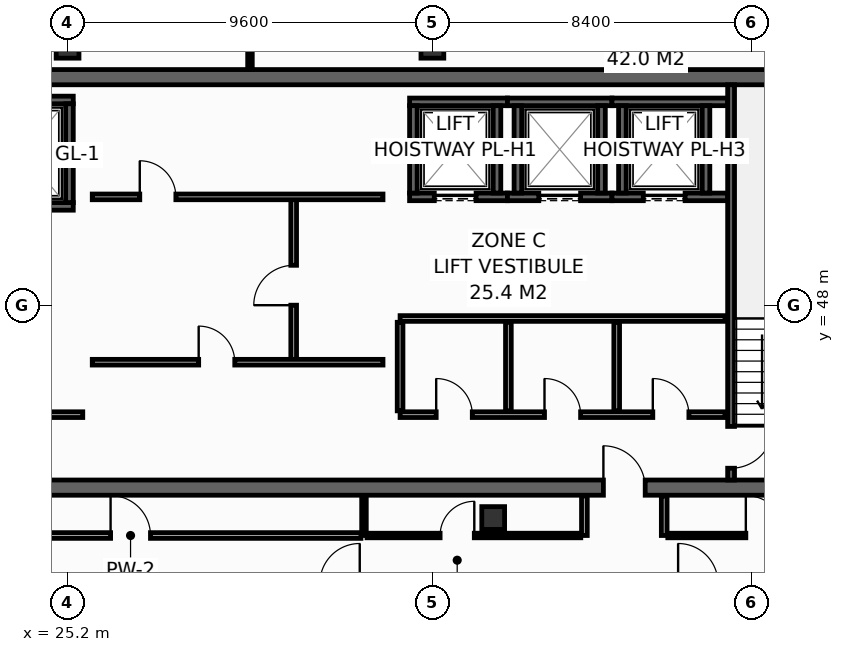
"""IFC4 building model, lengths in metres.
Left out: names, types, materials, properties, quantities, classifications, styles, units other than length and angle.
Written with IfcOpenShell. Run it as: python <this file> out.ifc"""

import sys

from ifc_helpers import new_model, si_unit, direction, frame, frame_2d, origin, origin_2d, place, context, subcontext, project, spatial, rectangle, hollow_rectangle, extrude, element, fill, save


model = new_model("IFC4")
c1 = context("Model", 3, precision=1e-05, world=origin(), true_north=direction((0.0, 1.0)))
c2 = subcontext(c1, "Body", "Model", "MODEL_VIEW")
j1 = project(units=[si_unit("LENGTHUNIT", "METRE"), si_unit("PLANEANGLEUNIT", "RADIAN")], contexts=[c1])
p1 = place(None, origin())
s1 = spatial("IfcSite", under=j1, at=p1, CompositionType="ELEMENT")
p2 = place(p1, origin())
s2 = spatial("IfcBuilding", under=s1, at=p2, CompositionType="ELEMENT")
p3 = place(p2, frame((0.0, 0.0, 299.0)))
s3 = spatial("IfcBuildingStorey", under=s2, at=p3, CompositionType="ELEMENT", Elevation=299.0)
p4 = place(p3, frame((13.7, 43.2, 0.0), z_axis=(0.0, 0.0, 1.0), x_axis=(1.0, 0.0, 0.0)))
e1 = element("IfcWall", 1, at=p4, inside=s3, PredefinedType="SHEAR", context=c2, shape_type="SweptSolid", body=[
    extrude(rectangle(XDim=32.5, YDim=0.4, at=frame_2d((16.25, 0.0))), origin(), (0.0, 0.0, 1.0), 3.55),
])
p5 = place(p4, frame((5.4, 0.0, 0.0)))
e2 = element("IfcOpeningElement", 2, at=p5, cuts=e1, PredefinedType="OPENING", context=c2, shape_type="SweptSolid", body=[
    extrude(rectangle(XDim=1.1, YDim=2.15, at=frame_2d((0.55, 1.075))), frame((0.0, 0.21, 0.0), z_axis=(0.0, -1.0, 0.0), x_axis=(1.0, 0.0, 0.0)), (0.0, 0.0, 1.0), 0.42),
])
p6 = place(p4, frame((25.6, 0.0, 0.0)))
e3 = element("IfcOpeningElement", 3, at=p6, cuts=e1, PredefinedType="OPENING", context=c2, shape_type="SweptSolid", body=[
    extrude(rectangle(XDim=1.1, YDim=2.15, at=frame_2d((0.55, 1.075))), frame((0.0, 0.21, 0.0), z_axis=(0.0, -1.0, 0.0), x_axis=(1.0, 0.0, 0.0)), (0.0, 0.0, 1.0), 0.42),
])
p7 = place(p3, frame((13.7, 54.0, 0.0), z_axis=(0.0, 0.0, 1.0), x_axis=(1.0, 0.0, 0.0)))
e4 = element("IfcWall", 4, at=p7, inside=s3, PredefinedType="SHEAR", context=c2, shape_type="SweptSolid", body=[
    extrude(rectangle(XDim=32.5, YDim=0.4, at=frame_2d((16.25, 0.0))), origin(), (0.0, 0.0, 1.0), 3.55),
])
for number, where, z_axis, x_axis in (
    (5, (25.2, 54.8, 0.0), (0.0, 0.0, 1.0), (1.0, 0.0, 0.0)),
    (6, (34.8, 54.8, 0.0), (0.0, 0.0, 1.0), (1.0, 0.0, 0.0)),
    (7, (36.4, 42.4, 0.0), (0.0, 0.0, 1.0), (1.0, 0.0, 0.0)),
):
    element("IfcColumn", number, at=place(p3, frame(where, z_axis=z_axis, x_axis=x_axis)), inside=s3, PredefinedType="COLUMN", context=c2, shape_type="SweptSolid", body=[
        extrude(hollow_rectangle(XDim=0.6, YDim=0.6, WallThickness=0.028, at=origin_2d()), origin(), (0.0, 0.0, 1.0), 3.8),
    ])
p8 = place(p3, frame((22.5, 50.6, 0.0), z_axis=(0.0, 0.0, 1.0), x_axis=(1.0, 0.0, 0.0)))
e8 = element("IfcWall", 8, at=p8, inside=s3, PredefinedType="SHEAR", context=c2, shape_type="SweptSolid", body=[
    extrude(rectangle(XDim=2.85, YDim=0.2, at=frame_2d((1.425, 0.0))), origin(), (0.0, 0.0, 1.0), 3.55),
])
p9 = place(p8, frame((0.925, 0.0, 0.0)))
e9 = element("IfcOpeningElement", 9, at=p9, cuts=e8, PredefinedType="OPENING", context=c2, shape_type="SweptSolid", body=[
    extrude(rectangle(XDim=1.25, YDim=2.3, at=frame_2d((0.625, 1.15))), frame((0.0, 0.11, 0.0), z_axis=(0.0, -1.0, 0.0), x_axis=(1.0, 0.0, 0.0)), (0.0, 0.0, 1.0), 0.22),
])
p10 = place(p3, frame((22.5, 53.4, 0.0), z_axis=(0.0, 0.0, 1.0), x_axis=(1.0, 0.0, 0.0)))
e10 = element("IfcWall", 10, at=p10, inside=s3, PredefinedType="SHEAR", context=c2, shape_type="SweptSolid", body=[
    extrude(rectangle(XDim=2.85, YDim=0.2, at=frame_2d((1.425, 0.0))), origin(), (0.0, 0.0, 1.0), 3.55),
])
p11 = place(p3, frame((25.25, 50.7, 0.0), z_axis=(0.0, 0.0, 1.0), x_axis=(0.0, 1.0, 0.0)))
e11 = element("IfcWall", 11, at=p11, inside=s3, PredefinedType="SHEAR", context=c2, shape_type="SweptSolid", body=[
    extrude(rectangle(XDim=2.6, YDim=0.2, at=frame_2d((1.3, 0.0))), origin(), (0.0, 0.0, 1.0), 3.55),
])
p12 = place(p3, frame((34.2, 50.85, 0.0), z_axis=(0.0, 0.0, 1.0), x_axis=(1.0, 0.0, 0.0)))
e12 = element("IfcWall", 12, at=p12, inside=s3, PredefinedType="SHEAR", context=c2, shape_type="SweptSolid", body=[
    extrude(rectangle(XDim=2.575, YDim=0.2, at=frame_2d((1.288, 0.0))), origin(), (0.0, 0.0, 1.0), 3.55),
])
p13 = place(p12, frame((0.65, 0.0, 0.0)))
e13 = element("IfcOpeningElement", 13, at=p13, cuts=e12, PredefinedType="OPENING", context=c2, shape_type="SweptSolid", body=[
    extrude(rectangle(XDim=1.1, YDim=2.2, at=frame_2d((0.55, 1.1))), frame((0.0, 0.11, 0.0), z_axis=(0.0, -1.0, 0.0), x_axis=(1.0, 0.0, 0.0)), (0.0, 0.0, 1.0), 0.22),
])
p14 = place(p3, frame((34.2, 53.35, 0.0), z_axis=(0.0, 0.0, 1.0), x_axis=(1.0, 0.0, 0.0)))
e14 = element("IfcWall", 14, at=p14, inside=s3, PredefinedType="SHEAR", context=c2, shape_type="SweptSolid", body=[
    extrude(rectangle(XDim=2.575, YDim=0.2, at=frame_2d((1.288, 0.0))), origin(), (0.0, 0.0, 1.0), 3.55),
])
for number, where, z_axis, x_axis in (
    (15, (34.3, 50.95, 0.0), (0.0, 0.0, 1.0), (0.0, 1.0, 0.0)),
    (16, (36.5, 50.95, 0.0), (0.0, 0.0, 1.0), (0.0, 1.0, 0.0)),
):
    element("IfcWall", number, at=place(p3, frame(where, z_axis=z_axis, x_axis=x_axis)), inside=s3, PredefinedType="SHEAR", context=c2, shape_type="SweptSolid", body=[
        extrude(rectangle(XDim=2.3, YDim=0.2, at=frame_2d((1.15, 0.0))), origin(), (0.0, 0.0, 1.0), 3.55),
    ])
p15 = place(p3, frame((36.775, 50.85, 0.0), z_axis=(0.0, 0.0, 1.0), x_axis=(1.0, 0.0, 0.0)))
e17 = element("IfcWall", 17, at=p15, inside=s3, PredefinedType="SHEAR", context=c2, shape_type="SweptSolid", body=[
    extrude(rectangle(XDim=2.75, YDim=0.2, at=frame_2d((1.375, 0.0))), origin(), (0.0, 0.0, 1.0), 3.55),
])
p16 = place(p15, frame((0.825, 0.0, 0.0)))
e18 = element("IfcOpeningElement", 18, at=p16, cuts=e17, PredefinedType="OPENING", context=c2, shape_type="SweptSolid", body=[
    extrude(rectangle(XDim=1.1, YDim=2.2, at=frame_2d((0.55, 1.1))), frame((0.0, 0.11, 0.0), z_axis=(0.0, -1.0, 0.0), x_axis=(1.0, 0.0, 0.0)), (0.0, 0.0, 1.0), 0.22),
])
p17 = place(p3, frame((36.775, 53.35, 0.0), z_axis=(0.0, 0.0, 1.0), x_axis=(1.0, 0.0, 0.0)))
e19 = element("IfcWall", 19, at=p17, inside=s3, PredefinedType="SHEAR", context=c2, shape_type="SweptSolid", body=[
    extrude(rectangle(XDim=2.75, YDim=0.2, at=frame_2d((1.375, 0.0))), origin(), (0.0, 0.0, 1.0), 3.55),
])
for number, where, z_axis, x_axis in (
    (20, (37.05, 50.95, 0.0), (0.0, 0.0, 1.0), (0.0, 1.0, 0.0)),
    (21, (39.25, 50.95, 0.0), (0.0, 0.0, 1.0), (0.0, 1.0, 0.0)),
):
    element("IfcWall", number, at=place(p3, frame(where, z_axis=z_axis, x_axis=x_axis)), inside=s3, PredefinedType="SHEAR", context=c2, shape_type="SweptSolid", body=[
        extrude(rectangle(XDim=2.3, YDim=0.2, at=frame_2d((1.15, 0.0))), origin(), (0.0, 0.0, 1.0), 3.55),
    ])
p18 = place(p3, frame((39.525, 50.85, 0.0), z_axis=(0.0, 0.0, 1.0), x_axis=(1.0, 0.0, 0.0)))
e22 = element("IfcWall", 22, at=p18, inside=s3, PredefinedType="SHEAR", context=c2, shape_type="SweptSolid", body=[
    extrude(rectangle(XDim=3.045, YDim=0.2, at=frame_2d((1.522, 0.0))), origin(), (0.0, 0.0, 1.0), 3.55),
])
p19 = place(p18, frame((0.825, 0.0, 0.0)))
e23 = element("IfcOpeningElement", 23, at=p19, cuts=e22, PredefinedType="OPENING", context=c2, shape_type="SweptSolid", body=[
    extrude(rectangle(XDim=1.1, YDim=2.2, at=frame_2d((0.55, 1.1))), frame((0.0, 0.11, 0.0), z_axis=(0.0, -1.0, 0.0), x_axis=(1.0, 0.0, 0.0)), (0.0, 0.0, 1.0), 0.22),
])
p20 = place(p3, frame((39.525, 53.35, 0.0), z_axis=(0.0, 0.0, 1.0), x_axis=(1.0, 0.0, 0.0)))
e24 = element("IfcWall", 24, at=p20, inside=s3, PredefinedType="SHEAR", context=c2, shape_type="SweptSolid", body=[
    extrude(rectangle(XDim=3.045, YDim=0.2, at=frame_2d((1.522, 0.0))), origin(), (0.0, 0.0, 1.0), 3.55),
])
for number, where, z_axis, x_axis in (
    (25, (39.8, 50.95, 0.0), (0.0, 0.0, 1.0), (0.0, 1.0, 0.0)),
    (26, (42.0, 50.95, 0.0), (0.0, 0.0, 1.0), (0.0, 1.0, 0.0)),
):
    element("IfcWall", number, at=place(p3, frame(where, z_axis=z_axis, x_axis=x_axis)), inside=s3, PredefinedType="SHEAR", context=c2, shape_type="SweptSolid", body=[
        extrude(rectangle(XDim=2.3, YDim=0.2, at=frame_2d((1.15, 0.0))), origin(), (0.0, 0.0, 1.0), 3.55),
    ])
p21 = place(p3, frame((42.66, 53.8, 0.0), z_axis=(0.0, 0.0, 1.0), x_axis=(0.0, -1.0, 0.0)))
e27 = element("IfcWall", 27, at=p21, inside=s3, PredefinedType="SHEAR", context=c2, shape_type="SweptSolid", body=[
    extrude(rectangle(XDim=10.4, YDim=0.18, at=frame_2d((5.2, 0.0))), origin(), (0.0, 0.0, 1.0), 3.55),
])
p22 = place(p21, frame((8.99, 0.0, 0.0)))
e28 = element("IfcOpeningElement", 28, at=p22, cuts=e27, PredefinedType="OPENING", context=c2, shape_type="SweptSolid", body=[
    extrude(rectangle(XDim=1.1, YDim=2.15, at=frame_2d((0.55, 1.075))), frame((0.0, 0.1, 0.0), z_axis=(0.0, -1.0, 0.0), x_axis=(1.0, 0.0, 0.0)), (0.0, 0.0, 1.0), 0.2),
])
p23 = place(p3, frame((22.68, 45.12, 0.0), z_axis=(0.0, 0.0, 1.0), x_axis=(1.0, 0.0, 0.0)))
e29 = element("IfcWall", 29, at=p23, inside=s3, PredefinedType="PARTITIONING", context=c2, shape_type="SweptSolid", body=[
    extrude(rectangle(XDim=2.92, YDim=0.15, at=frame_2d((1.46, 0.0))), origin(), (0.0, 0.0, 1.0), 3.55),
])
p24 = place(p23, frame((0.85, 0.0, 0.0)))
e30 = element("IfcOpeningElement", 30, at=p24, cuts=e29, PredefinedType="OPENING", context=c2, shape_type="SweptSolid", body=[
    extrude(rectangle(XDim=1.1, YDim=2.15, at=frame_2d((0.55, 1.075))), frame((0.0, 0.085, 0.0), z_axis=(0.0, -1.0, 0.0), x_axis=(1.0, 0.0, 0.0)), (0.0, 0.0, 1.0), 0.17),
])
p25 = place(p3, frame((31.15, 46.5, 0.0), z_axis=(0.0, 0.0, 1.0), x_axis=(0.0, 1.0, 0.0)))
e31 = element("IfcWall", 31, at=p25, inside=s3, PredefinedType="PARTITIONING", context=c2, shape_type="SweptSolid", body=[
    extrude(rectangle(XDim=4.35, YDim=0.15, at=frame_2d((2.175, 0.0))), origin(), (0.0, 0.0, 1.0), 3.55),
])
p26 = place(p25, frame((1.5, 0.0, 0.0)))
e32 = element("IfcOpeningElement", 32, at=p26, cuts=e31, PredefinedType="OPENING", context=c2, shape_type="SweptSolid", body=[
    extrude(rectangle(XDim=1.05, YDim=2.15, at=frame_2d((0.525, 1.075))), frame((0.0, 0.085, 0.0), z_axis=(0.0, -1.0, 0.0), x_axis=(1.0, 0.0, 0.0)), (0.0, 0.0, 1.0), 0.17),
])
p27 = place(p3, frame((33.95, 45.12, 0.0), z_axis=(0.0, 0.0, 1.0), x_axis=(1.0, 0.0, 0.0)))
e33 = element("IfcWall", 33, at=p27, inside=s3, PredefinedType="PARTITIONING", context=c2, shape_type="SweptSolid", body=[
    extrude(rectangle(XDim=8.55, YDim=0.15, at=frame_2d((4.275, 0.0))), origin(), (0.0, 0.0, 1.0), 3.55),
])
p28 = place(p27, frame((0.95, 0.0, 0.0)))
e34 = element("IfcOpeningElement", 34, at=p28, cuts=e33, PredefinedType="OPENING", context=c2, shape_type="SweptSolid", body=[
    extrude(rectangle(XDim=0.95, YDim=2.15, at=frame_2d((0.475, 1.075))), frame((0.0, 0.085, 0.0), z_axis=(0.0, -1.0, 0.0), x_axis=(1.0, 0.0, 0.0)), (0.0, 0.0, 1.0), 0.17),
])
p29 = place(p27, frame((3.8, 0.0, 0.0)))
e35 = element("IfcOpeningElement", 35, at=p29, cuts=e33, PredefinedType="OPENING", context=c2, shape_type="SweptSolid", body=[
    extrude(rectangle(XDim=0.95, YDim=2.15, at=frame_2d((0.475, 1.075))), frame((0.0, 0.085, 0.0), z_axis=(0.0, -1.0, 0.0), x_axis=(1.0, 0.0, 0.0)), (0.0, 0.0, 1.0), 0.17),
])
p30 = place(p27, frame((6.65, 0.0, 0.0)))
e36 = element("IfcOpeningElement", 36, at=p30, cuts=e33, PredefinedType="OPENING", context=c2, shape_type="SweptSolid", body=[
    extrude(rectangle(XDim=0.95, YDim=2.15, at=frame_2d((0.475, 1.075))), frame((0.0, 0.085, 0.0), z_axis=(0.0, -1.0, 0.0), x_axis=(1.0, 0.0, 0.0)), (0.0, 0.0, 1.0), 0.17),
])
p31 = place(p3, frame((33.95, 47.65, 0.0), z_axis=(0.0, 0.0, 1.0), x_axis=(1.0, 0.0, 0.0)))
e37 = element("IfcWall", 37, at=p31, inside=s3, PredefinedType="PARTITIONING", context=c2, shape_type="SweptSolid", body=[
    extrude(rectangle(XDim=8.55, YDim=0.15, at=frame_2d((4.275, 0.0))), origin(), (0.0, 0.0, 1.0), 3.55),
])
for number, where, z_axis, x_axis in (
    (38, (33.95, 45.22, 0.0), (0.0, 0.0, 1.0), (0.0, 1.0, 0.0)),
    (39, (36.8, 45.22, 0.0), (0.0, 0.0, 1.0), (0.0, 1.0, 0.0)),
    (40, (39.65, 45.22, 0.0), (0.0, 0.0, 1.0), (0.0, 1.0, 0.0)),
):
    element("IfcWall", number, at=place(p3, frame(where, z_axis=z_axis, x_axis=x_axis)), inside=s3, PredefinedType="PARTITIONING", context=c2, shape_type="SweptSolid", body=[
        extrude(rectangle(XDim=2.33, YDim=0.15, at=frame_2d((1.165, 0.0))), origin(), (0.0, 0.0, 1.0), 3.55),
    ])
p32 = place(p3, frame((25.85, 50.85, 0.0), z_axis=(0.0, 0.0, 1.0), x_axis=(1.0, 0.0, 0.0)))
e41 = element("IfcWall", 41, at=p32, inside=s3, PredefinedType="PARTITIONING", context=c2, shape_type="SweptSolid", body=[
    extrude(rectangle(XDim=7.65, YDim=0.15, at=frame_2d((3.825, 0.0))), origin(), (0.0, 0.0, 1.0), 3.55),
])
p33 = place(p32, frame((1.25, 0.0, 0.0)))
e42 = element("IfcOpeningElement", 42, at=p33, cuts=e41, PredefinedType="OPENING", context=c2, shape_type="SweptSolid", body=[
    extrude(rectangle(XDim=0.95, YDim=2.15, at=frame_2d((0.475, 1.075))), frame((0.0, 0.085, 0.0), z_axis=(0.0, -1.0, 0.0), x_axis=(1.0, 0.0, 0.0)), (0.0, 0.0, 1.0), 0.17),
])
p34 = place(p3, frame((25.85, 46.5, 0.0), z_axis=(0.0, 0.0, 1.0), x_axis=(1.0, 0.0, 0.0)))
e43 = element("IfcWall", 43, at=p34, inside=s3, PredefinedType="PARTITIONING", context=c2, shape_type="SweptSolid", body=[
    extrude(rectangle(XDim=7.65, YDim=0.15, at=frame_2d((3.825, 0.0))), origin(), (0.0, 0.0, 1.0), 3.55),
])
p35 = place(p34, frame((2.8, 0.0, 0.0)))
e44 = element("IfcOpeningElement", 44, at=p35, cuts=e43, PredefinedType="OPENING", context=c2, shape_type="SweptSolid", body=[
    extrude(rectangle(XDim=0.95, YDim=2.15, at=frame_2d((0.475, 1.075))), frame((0.0, 0.085, 0.0), z_axis=(0.0, -1.0, 0.0), x_axis=(1.0, 0.0, 0.0)), (0.0, 0.0, 1.0), 0.17),
])
p36 = place(p3, frame((30.0, 54.22, 0.0), z_axis=(0.0, 0.0, 1.0), x_axis=(0.0, 1.0, 0.0)))
e45 = element("IfcWall", 45, at=p36, inside=s3, PredefinedType="PARTITIONING", context=c2, shape_type="SweptSolid", body=[
    extrude(rectangle(XDim=1.775, YDim=0.12, at=frame_2d((0.888, 0.0))), origin(), (0.0, 0.0, 1.0), 2.935),
])
for number, where, z_axis, x_axis in (
    (46, (38.8, 41.94, 0.0), (0.0, 0.0, 1.0), (0.0, 1.0, 0.0)),
    (47, (40.9, 41.94, 0.0), (0.0, 0.0, 1.0), (0.0, 1.0, 0.0)),
):
    element("IfcWall", number, at=place(p3, frame(where, z_axis=z_axis, x_axis=x_axis)), inside=s3, PredefinedType="PARTITIONING", context=c2, shape_type="SweptSolid", body=[
        extrude(rectangle(XDim=1.04, YDim=0.15, at=frame_2d((0.52, 0.0))), origin(), (0.0, 0.0, 1.0), 3.55),
    ])
p37 = place(p3, frame((33.0, 41.94, 0.0), z_axis=(0.0, 0.0, 1.0), x_axis=(0.0, 1.0, 0.0)))
e48 = element("IfcWall", 48, at=p37, inside=s3, PredefinedType="PARTITIONING", context=c2, shape_type="SweptSolid", body=[
    extrude(rectangle(XDim=1.04, YDim=0.12, at=frame_2d((0.52, 0.0))), origin(), (0.0, 0.0, 1.0), 2.947),
])
p38 = place(p3, frame((20.795, 41.94, 0.0), z_axis=(0.0, 0.0, 1.0), x_axis=(1.0, 0.0, 0.0)))
e49 = element("IfcWall", 49, at=p38, inside=s3, PredefinedType="PARTITIONING", context=c2, shape_type="SweptSolid", body=[
    extrude(rectangle(XDim=12.125, YDim=0.15, at=frame_2d((6.062, 0.0))), origin(), (0.0, 0.0, 1.0), 3.047),
])
p39 = place(p38, frame((5.537, 0.0, 0.0)))
e50 = element("IfcOpeningElement", 50, at=p39, cuts=e49, PredefinedType="OPENING", context=c2, shape_type="SweptSolid", body=[
    extrude(rectangle(XDim=1.05, YDim=2.15, at=frame_2d((0.525, 1.075))), frame((0.0, 0.085, 0.0), z_axis=(0.0, -1.0, 0.0), x_axis=(1.0, 0.0, 0.0)), (0.0, 0.0, 1.0), 0.17),
])
p40 = place(p3, frame((33.08, 41.94, 0.0), z_axis=(0.0, 0.0, 1.0), x_axis=(1.0, 0.0, 0.0)))
e51 = element("IfcWall", 51, at=p40, inside=s3, PredefinedType="PARTITIONING", context=c2, shape_type="SweptSolid", body=[
    extrude(rectangle(XDim=5.625, YDim=0.12, at=frame_2d((2.812, 0.0))), origin(), (0.0, 0.0, 1.0), 3.047),
])
p41 = place(p40, frame((1.923, 0.0, 0.0)))
e52 = element("IfcOpeningElement", 52, at=p41, cuts=e51, PredefinedType="OPENING", context=c2, shape_type="SweptSolid", body=[
    extrude(rectangle(XDim=0.9, YDim=2.1, at=frame_2d((0.45, 1.05))), frame((0.0, 0.07, 0.0), z_axis=(0.0, -1.0, 0.0), x_axis=(1.0, 0.0, 0.0)), (0.0, 0.0, 1.0), 0.14),
])
p42 = place(p3, frame((40.995, 41.94, 0.0), z_axis=(0.0, 0.0, 1.0), x_axis=(1.0, 0.0, 0.0)))
e53 = element("IfcWall", 53, at=p42, inside=s3, PredefinedType="PARTITIONING", context=c2, shape_type="SweptSolid", body=[
    extrude(rectangle(XDim=5.155, YDim=0.12, at=frame_2d((2.577, 0.0))), origin(), (0.0, 0.0, 1.0), 3.55),
])
p43 = place(p42, frame((2.053, 0.0, 0.0)))
e54 = element("IfcOpeningElement", 54, at=p43, cuts=e53, PredefinedType="OPENING", context=c2, shape_type="SweptSolid", body=[
    extrude(rectangle(XDim=1.05, YDim=2.15, at=frame_2d((0.525, 1.075))), frame((0.0, 0.07, 0.0), z_axis=(0.0, -1.0, 0.0), x_axis=(1.0, 0.0, 0.0)), (0.0, 0.0, 1.0), 0.14),
])
p44 = place(p13, origin())
e55 = element("IfcDoor", 55, at=p44, inside=s3, OperationType="SLIDING_TO_LEFT", PredefinedType="DOOR", context=c2, shape_type="SweptSolid", body=[
    extrude(rectangle(XDim=1.1, YDim=2.2, at=frame_2d((0.55, 1.1))), frame((0.0, 0.025, 0.0), z_axis=(0.0, -1.0, 0.0), x_axis=(1.0, 0.0, 0.0)), (0.0, 0.0, 1.0), 0.05),
])
fill(e13, e55)
p45 = place(p16, origin())
e56 = element("IfcDoor", 56, at=p45, inside=s3, OperationType="SLIDING_TO_LEFT", PredefinedType="DOOR", context=c2, shape_type="SweptSolid", body=[
    extrude(rectangle(XDim=1.1, YDim=2.2, at=frame_2d((0.55, 1.1))), frame((0.0, 0.025, 0.0), z_axis=(0.0, -1.0, 0.0), x_axis=(1.0, 0.0, 0.0)), (0.0, 0.0, 1.0), 0.05),
])
fill(e18, e56)
p46 = place(p19, origin())
e57 = element("IfcDoor", 57, at=p46, inside=s3, OperationType="SLIDING_TO_LEFT", PredefinedType="DOOR", context=c2, shape_type="SweptSolid", body=[
    extrude(rectangle(XDim=1.1, YDim=2.2, at=frame_2d((0.55, 1.1))), frame((0.0, 0.025, 0.0), z_axis=(0.0, -1.0, 0.0), x_axis=(1.0, 0.0, 0.0)), (0.0, 0.0, 1.0), 0.05),
])
fill(e23, e57)
p47 = place(p22, origin())
e58 = element("IfcDoor", 58, at=p47, inside=s3, OperationType="SINGLE_SWING_LEFT", PredefinedType="DOOR", context=c2, shape_type="SweptSolid", body=[
    extrude(rectangle(XDim=1.1, YDim=2.15, at=frame_2d((0.55, 1.075))), frame((0.0, 0.025, 0.0), z_axis=(0.0, -1.0, 0.0), x_axis=(1.0, 0.0, 0.0)), (0.0, 0.0, 1.0), 0.05),
])
fill(e28, e58)
p48 = place(p6, origin())
e59 = element("IfcDoor", 59, at=p48, inside=s3, OperationType="SINGLE_SWING_LEFT", PredefinedType="DOOR", context=c2, shape_type="SweptSolid", body=[
    extrude(rectangle(XDim=1.1, YDim=2.15, at=frame_2d((0.55, 1.075))), frame((0.0, 0.025, 0.0), z_axis=(0.0, -1.0, 0.0), x_axis=(1.0, 0.0, 0.0)), (0.0, 0.0, 1.0), 0.05),
])
fill(e3, e59)
p49 = place(p26, origin())
e60 = element("IfcDoor", 60, at=p49, inside=s3, OperationType="SINGLE_SWING_LEFT", PredefinedType="DOOR", context=c2, shape_type="SweptSolid", body=[
    extrude(rectangle(XDim=1.05, YDim=2.15, at=frame_2d((0.525, 1.075))), frame((0.0, 0.025, 0.0), z_axis=(0.0, -1.0, 0.0), x_axis=(1.0, 0.0, 0.0)), (0.0, 0.0, 1.0), 0.05),
])
fill(e32, e60)
p50 = place(p28, origin())
e61 = element("IfcDoor", 61, at=p50, inside=s3, OperationType="SINGLE_SWING_LEFT", PredefinedType="DOOR", context=c2, shape_type="SweptSolid", body=[
    extrude(rectangle(XDim=0.95, YDim=2.15, at=frame_2d((0.475, 1.075))), frame((0.0, 0.025, 0.0), z_axis=(0.0, -1.0, 0.0), x_axis=(1.0, 0.0, 0.0)), (0.0, 0.0, 1.0), 0.05),
])
fill(e34, e61)
p51 = place(p29, origin())
e62 = element("IfcDoor", 62, at=p51, inside=s3, OperationType="SINGLE_SWING_LEFT", PredefinedType="DOOR", context=c2, shape_type="SweptSolid", body=[
    extrude(rectangle(XDim=0.95, YDim=2.15, at=frame_2d((0.475, 1.075))), frame((0.0, 0.025, 0.0), z_axis=(0.0, -1.0, 0.0), x_axis=(1.0, 0.0, 0.0)), (0.0, 0.0, 1.0), 0.05),
])
fill(e35, e62)
p52 = place(p30, origin())
e63 = element("IfcDoor", 63, at=p52, inside=s3, OperationType="SINGLE_SWING_LEFT", PredefinedType="DOOR", context=c2, shape_type="SweptSolid", body=[
    extrude(rectangle(XDim=0.95, YDim=2.15, at=frame_2d((0.475, 1.075))), frame((0.0, 0.025, 0.0), z_axis=(0.0, -1.0, 0.0), x_axis=(1.0, 0.0, 0.0)), (0.0, 0.0, 1.0), 0.05),
])
fill(e36, e63)
p53 = place(p33, origin())
e64 = element("IfcDoor", 64, at=p53, inside=s3, OperationType="SINGLE_SWING_LEFT", PredefinedType="DOOR", context=c2, shape_type="SweptSolid", body=[
    extrude(rectangle(XDim=0.95, YDim=2.15, at=frame_2d((0.475, 1.075))), frame((0.0, 0.025, 0.0), z_axis=(0.0, -1.0, 0.0), x_axis=(1.0, 0.0, 0.0)), (0.0, 0.0, 1.0), 0.05),
])
fill(e42, e64)
p54 = place(p35, origin())
e65 = element("IfcDoor", 65, at=p54, inside=s3, OperationType="SINGLE_SWING_LEFT", PredefinedType="DOOR", context=c2, shape_type="SweptSolid", body=[
    extrude(rectangle(XDim=0.95, YDim=2.15, at=frame_2d((0.475, 1.075))), frame((0.0, 0.025, 0.0), z_axis=(0.0, -1.0, 0.0), x_axis=(1.0, 0.0, 0.0)), (0.0, 0.0, 1.0), 0.05),
])
fill(e44, e65)
p55 = place(p39, origin())
e66 = element("IfcDoor", 66, at=p55, inside=s3, OperationType="SINGLE_SWING_LEFT", PredefinedType="DOOR", context=c2, shape_type="SweptSolid", body=[
    extrude(rectangle(XDim=1.05, YDim=2.15, at=frame_2d((0.525, 1.075))), frame((0.0, 0.025, 0.0), z_axis=(0.0, -1.0, 0.0), x_axis=(1.0, 0.0, 0.0)), (0.0, 0.0, 1.0), 0.05),
])
fill(e50, e66)
p56 = place(p41, origin())
e67 = element("IfcDoor", 67, at=p56, inside=s3, OperationType="SINGLE_SWING_RIGHT", PredefinedType="DOOR", context=c2, shape_type="SweptSolid", body=[
    extrude(rectangle(XDim=0.9, YDim=2.1, at=frame_2d((0.45, 1.05))), frame((0.0, 0.025, 0.0), z_axis=(0.0, -1.0, 0.0), x_axis=(1.0, 0.0, 0.0)), (0.0, 0.0, 1.0), 0.05),
])
fill(e52, e67)
p57 = place(p43, origin())
e68 = element("IfcDoor", 68, at=p57, inside=s3, OperationType="SINGLE_SWING_LEFT", PredefinedType="DOOR", context=c2, shape_type="SweptSolid", body=[
    extrude(rectangle(XDim=1.05, YDim=2.15, at=frame_2d((0.525, 1.075))), frame((0.0, 0.025, 0.0), z_axis=(0.0, -1.0, 0.0), x_axis=(1.0, 0.0, 0.0)), (0.0, 0.0, 1.0), 0.05),
])
fill(e54, e68)
save(model, sys.argv[1])
